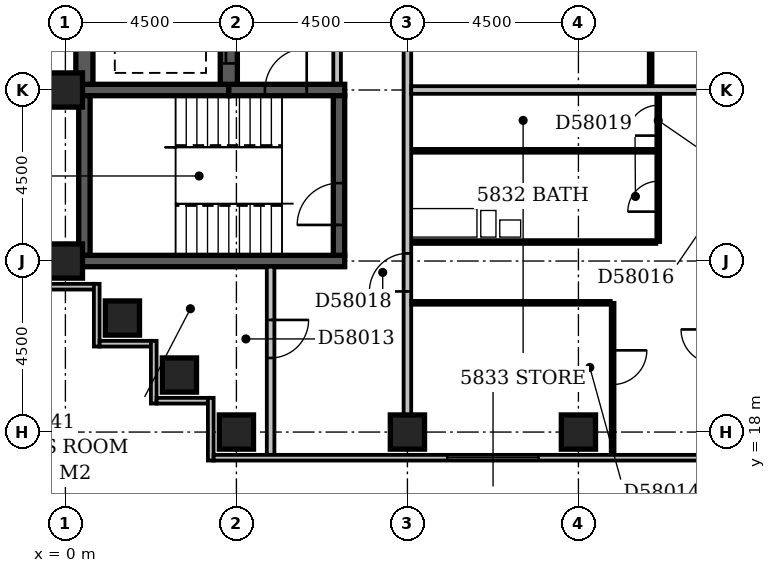
"""IFC4 building model, lengths in metres.
Left out: names, types, materials, properties, quantities, classifications, styles, units other than length and angle.
Written with IfcOpenShell. Run it as: python <this file> out.ifc"""

import sys

from ifc_helpers import new_model, si_unit, direction, frame, frame_2d, origin, origin_2d, place, context, subcontext, project, spatial, rectangle, extrude, element, fill, save


model = new_model("IFC4")
c1 = context("Model", 3, precision=1e-05, world=origin(), true_north=direction((0.0, 1.0)))
c2 = subcontext(c1, "Body", "Model", "MODEL_VIEW")
j1 = project(units=[si_unit("LENGTHUNIT", "METRE"), si_unit("PLANEANGLEUNIT", "RADIAN")], contexts=[c1])
p1 = place(None, origin())
s1 = spatial("IfcSite", under=j1, at=p1, CompositionType="ELEMENT")
p2 = place(p1, origin())
s2 = spatial("IfcBuilding", under=s1, at=p2, CompositionType="ELEMENT")
p3 = place(p2, frame((0.0, 0.0, 225.8)))
s3 = spatial("IfcBuildingStorey", under=s2, at=p3, CompositionType="ELEMENT", Elevation=225.8)
p4 = place(p3, frame((0.35, 22.5, -0.3), z_axis=(0.0, 0.0, 1.0), x_axis=(1.0, 0.0, 0.0)))
e1 = element("IfcWall", 1, at=p4, inside=s3, PredefinedType="SHEAR", context=c2, shape_type="SweptSolid", body=[
    extrude(rectangle(XDim=7.0, YDim=0.3, at=frame_2d((3.5, 0.0))), origin(), (0.0, 0.0, 1.0), 3.6),
])
p5 = place(p3, frame((0.35, 27.0, -0.3), z_axis=(0.0, 0.0, 1.0), x_axis=(1.0, 0.0, 0.0)))
e2 = element("IfcWall", 2, at=p5, inside=s3, PredefinedType="SHEAR", context=c2, shape_type="SweptSolid", body=[
    extrude(rectangle(XDim=3.95, YDim=0.3, at=frame_2d((1.975, 0.0))), origin(), (0.0, 0.0, 1.0), 3.6),
])
p6 = place(p3, frame((0.5, 22.65, -0.3), z_axis=(0.0, 0.0, 1.0), x_axis=(0.0, 1.0, 0.0)))
e3 = element("IfcWall", 3, at=p6, inside=s3, PredefinedType="SHEAR", context=c2, shape_type="SweptSolid", body=[
    extrude(rectangle(XDim=4.2, YDim=0.3, at=frame_2d((2.1, 0.0))), origin(), (0.0, 0.0, 1.0), 3.6),
])
p7 = place(p3, frame((0.5, 27.15, -0.3), z_axis=(0.0, 0.0, 1.0), x_axis=(0.0, 1.0, 0.0)))
e4 = element("IfcWall", 4, at=p7, inside=s3, PredefinedType="SHEAR", context=c2, shape_type="SweptSolid", body=[
    extrude(rectangle(XDim=22.125, YDim=0.45, at=frame_2d((11.062, 0.0))), origin(), (0.0, 0.0, 1.0), 3.6),
])
p8 = place(p3, frame((4.3, 27.0, -0.3), z_axis=(0.0, 0.0, 1.0), x_axis=(1.0, 0.0, 0.0)))
e5 = element("IfcWall", 5, at=p8, inside=s3, PredefinedType="SHEAR", context=c2, shape_type="SweptSolid", body=[
    extrude(rectangle(XDim=3.05, YDim=0.3, at=frame_2d((1.525, 0.0))), origin(), (0.0, 0.0, 1.0), 3.6),
])
p9 = place(p8, frame((0.95, 0.0, 0.3)))
e6 = element("IfcOpeningElement", 6, at=p9, cuts=e5, PredefinedType="OPENING", context=c2, shape_type="SweptSolid", body=[
    extrude(rectangle(XDim=1.1, YDim=2.1, at=frame_2d((0.55, 1.05))), frame((0.0, 0.162, 0.0), z_axis=(0.0, -1.0, 0.0), x_axis=(1.0, 0.0, 0.0)), (0.0, 0.0, 1.0), 0.324),
])
p10 = place(p3, frame((4.3, 27.15, -0.3), z_axis=(0.0, 0.0, 1.0), x_axis=(0.0, 1.0, 0.0)))
e7 = element("IfcWall", 7, at=p10, inside=s3, PredefinedType="SHEAR", context=c2, shape_type="SweptSolid", body=[
    extrude(rectangle(XDim=22.125, YDim=0.45, at=frame_2d((11.062, 0.0))), origin(), (0.0, 0.0, 1.0), 3.6),
])
p11 = place(p10, frame((3.05, 0.0, 0.3)))
e8 = element("IfcOpeningElement", 8, at=p11, cuts=e7, PredefinedType="OPENING", context=c2, shape_type="SweptSolid", body=[
    extrude(rectangle(XDim=1.1, YDim=2.1, at=frame_2d((0.55, 1.05))), frame((0.0, 0.237, 0.0), z_axis=(0.0, -1.0, 0.0), x_axis=(1.0, 0.0, 0.0)), (0.0, 0.0, 1.0), 0.474),
])
p12 = place(p10, frame((0.55, 0.0, 0.3)))
e9 = element("IfcOpeningElement", 9, at=p12, cuts=e7, PredefinedType="OPENING", context=c2, shape_type="SweptSolid", body=[
    extrude(rectangle(XDim=1.1, YDim=2.1, at=frame_2d((0.55, 1.05))), frame((0.0, 0.237, 0.0), z_axis=(0.0, -1.0, 0.0), x_axis=(1.0, 0.0, 0.0)), (0.0, 0.0, 1.0), 0.474),
])
p13 = place(p10, frame((20.55, 0.0, 0.3)))
e10 = element("IfcOpeningElement", 10, at=p13, cuts=e7, PredefinedType="OPENING", context=c2, shape_type="SweptSolid", body=[
    extrude(rectangle(XDim=1.1, YDim=2.1, at=frame_2d((0.55, 1.05))), frame((0.0, 0.237, 0.0), z_axis=(0.0, -1.0, 0.0), x_axis=(1.0, 0.0, 0.0)), (0.0, 0.0, 1.0), 0.474),
])
p14 = place(p10, frame((18.05, 0.0, 0.3)))
e11 = element("IfcOpeningElement", 11, at=p14, cuts=e7, PredefinedType="OPENING", context=c2, shape_type="SweptSolid", body=[
    extrude(rectangle(XDim=1.1, YDim=2.1, at=frame_2d((0.55, 1.05))), frame((0.0, 0.237, 0.0), z_axis=(0.0, -1.0, 0.0), x_axis=(1.0, 0.0, 0.0)), (0.0, 0.0, 1.0), 0.474),
])
p15 = place(p10, frame((15.55, 0.0, 0.3)))
e12 = element("IfcOpeningElement", 12, at=p15, cuts=e7, PredefinedType="OPENING", context=c2, shape_type="SweptSolid", body=[
    extrude(rectangle(XDim=1.1, YDim=2.1, at=frame_2d((0.55, 1.05))), frame((0.0, 0.237, 0.0), z_axis=(0.0, -1.0, 0.0), x_axis=(1.0, 0.0, 0.0)), (0.0, 0.0, 1.0), 0.474),
])
p16 = place(p10, frame((13.05, 0.0, 0.3)))
e13 = element("IfcOpeningElement", 13, at=p16, cuts=e7, PredefinedType="OPENING", context=c2, shape_type="SweptSolid", body=[
    extrude(rectangle(XDim=1.1, YDim=2.1, at=frame_2d((0.55, 1.05))), frame((0.0, 0.237, 0.0), z_axis=(0.0, -1.0, 0.0), x_axis=(1.0, 0.0, 0.0)), (0.0, 0.0, 1.0), 0.474),
])
p17 = place(p10, frame((10.55, 0.0, 0.3)))
e14 = element("IfcOpeningElement", 14, at=p17, cuts=e7, PredefinedType="OPENING", context=c2, shape_type="SweptSolid", body=[
    extrude(rectangle(XDim=1.1, YDim=2.1, at=frame_2d((0.55, 1.05))), frame((0.0, 0.237, 0.0), z_axis=(0.0, -1.0, 0.0), x_axis=(1.0, 0.0, 0.0)), (0.0, 0.0, 1.0), 0.474),
])
p18 = place(p10, frame((8.05, 0.0, 0.3)))
e15 = element("IfcOpeningElement", 15, at=p18, cuts=e7, PredefinedType="OPENING", context=c2, shape_type="SweptSolid", body=[
    extrude(rectangle(XDim=1.1, YDim=2.1, at=frame_2d((0.55, 1.05))), frame((0.0, 0.237, 0.0), z_axis=(0.0, -1.0, 0.0), x_axis=(1.0, 0.0, 0.0)), (0.0, 0.0, 1.0), 0.474),
])
p19 = place(p10, frame((5.55, 0.0, 0.3)))
e16 = element("IfcOpeningElement", 16, at=p19, cuts=e7, PredefinedType="OPENING", context=c2, shape_type="SweptSolid", body=[
    extrude(rectangle(XDim=1.1, YDim=2.1, at=frame_2d((0.55, 1.05))), frame((0.0, 0.237, 0.0), z_axis=(0.0, -1.0, 0.0), x_axis=(1.0, 0.0, 0.0)), (0.0, 0.0, 1.0), 0.474),
])
p20 = place(p3, frame((7.2, 22.65, -0.3), z_axis=(0.0, 0.0, 1.0), x_axis=(0.0, 1.0, 0.0)))
e17 = element("IfcWall", 17, at=p20, inside=s3, PredefinedType="SHEAR", context=c2, shape_type="SweptSolid", body=[
    extrude(rectangle(XDim=4.2, YDim=0.3, at=frame_2d((2.1, 0.0))), origin(), (0.0, 0.0, 1.0), 3.6),
])
p21 = place(p20, frame((0.8, 0.0, 0.3)))
e18 = element("IfcOpeningElement", 18, at=p21, cuts=e17, PredefinedType="OPENING", context=c2, shape_type="SweptSolid", body=[
    extrude(rectangle(XDim=1.1, YDim=2.1, at=frame_2d((0.55, 1.05))), frame((0.0, 0.162, 0.0), z_axis=(0.0, -1.0, 0.0), x_axis=(1.0, 0.0, 0.0)), (0.0, 0.0, 1.0), 0.324),
])
for number, where, z_axis, x_axis in (
    (19, (4.5, 18.0, -0.3), (0.0, 0.0, 1.0), (1.0, 0.0, 0.0)),
    (20, (9.0, 18.0, -0.3), (0.0, 0.0, 1.0), (1.0, 0.0, 0.0)),
    (21, (13.5, 18.0, -0.3), (0.0, 0.0, 1.0), (1.0, 0.0, 0.0)),
    (22, (3.0, 19.5, -0.3), (0.0, 0.0, 1.0), (1.0, 0.0, 0.0)),
    (23, (1.5, 21.0, -0.3), (0.0, 0.0, 1.0), (1.0, 0.0, 0.0)),
    (24, (0.0, 22.5, -0.3), (0.0, 0.0, 1.0), (1.0, 0.0, 0.0)),
    (25, (0.0, 27.0, -0.3), (0.0, 0.0, 1.0), (1.0, 0.0, 0.0)),
):
    element("IfcColumn", number, at=place(p3, frame(where, z_axis=z_axis, x_axis=x_axis)), inside=s3, PredefinedType="COLUMN", context=c2, shape_type="SweptSolid", body=[
        extrude(rectangle(XDim=0.9, YDim=0.9, at=origin_2d()), origin(), (0.0, 0.0, 1.0), 3.6),
    ])
p22 = place(p3, frame((-0.6, 21.825, 0.0), z_axis=(0.0, 0.0, 1.0), x_axis=(1.0, 0.0, 0.0)))
e26 = element("IfcWall", 26, at=p22, inside=s3, PredefinedType="STANDARD", context=c2, shape_type="SweptSolid", body=[
    extrude(rectangle(XDim=1.35, YDim=0.15, at=frame_2d((0.675, 0.0))), origin(), (0.0, 0.0, 1.0), 2.7),
])
p23 = place(p3, frame((0.825, 21.9, 0.0), z_axis=(0.0, 0.0, 1.0), x_axis=(0.0, -1.0, 0.0)))
e27 = element("IfcWall", 27, at=p23, inside=s3, PredefinedType="STANDARD", context=c2, shape_type="SweptSolid", body=[
    extrude(rectangle(XDim=1.65, YDim=0.15, at=frame_2d((0.825, 0.0))), origin(), (0.0, 0.0, 1.0), 2.7),
])
p24 = place(p3, frame((0.9, 20.325, 0.0), z_axis=(0.0, 0.0, 1.0), x_axis=(1.0, 0.0, 0.0)))
e28 = element("IfcWall", 28, at=p24, inside=s3, PredefinedType="STANDARD", context=c2, shape_type="SweptSolid", body=[
    extrude(rectangle(XDim=1.35, YDim=0.15, at=frame_2d((0.675, 0.0))), origin(), (0.0, 0.0, 1.0), 2.7),
])
p25 = place(p3, frame((2.325, 20.4, 0.0), z_axis=(0.0, 0.0, 1.0), x_axis=(0.0, -1.0, 0.0)))
e29 = element("IfcWall", 29, at=p25, inside=s3, PredefinedType="STANDARD", context=c2, shape_type="SweptSolid", body=[
    extrude(rectangle(XDim=1.65, YDim=0.15, at=frame_2d((0.825, 0.0))), origin(), (0.0, 0.0, 1.0), 2.7),
])
p26 = place(p3, frame((2.4, 18.825, 0.0), z_axis=(0.0, 0.0, 1.0), x_axis=(1.0, 0.0, 0.0)))
e30 = element("IfcWall", 30, at=p26, inside=s3, PredefinedType="STANDARD", context=c2, shape_type="SweptSolid", body=[
    extrude(rectangle(XDim=1.35, YDim=0.15, at=frame_2d((0.675, 0.0))), origin(), (0.0, 0.0, 1.0), 2.7),
])
p27 = place(p3, frame((3.825, 18.9, 0.0), z_axis=(0.0, 0.0, 1.0), x_axis=(0.0, -1.0, 0.0)))
e31 = element("IfcWall", 31, at=p27, inside=s3, PredefinedType="STANDARD", context=c2, shape_type="SweptSolid", body=[
    extrude(rectangle(XDim=1.65, YDim=0.15, at=frame_2d((0.825, 0.0))), origin(), (0.0, 0.0, 1.0), 2.7),
])
p28 = place(p3, frame((3.9, 17.325, 0.0), z_axis=(0.0, 0.0, 1.0), x_axis=(1.0, 0.0, 0.0)))
e32 = element("IfcWall", 32, at=p28, inside=s3, PredefinedType="STANDARD", context=c2, shape_type="SweptSolid", body=[
    extrude(rectangle(XDim=19.35, YDim=0.15, at=frame_2d((9.675, 0.0))), origin(), (0.0, 0.0, 1.0), 2.7),
])
p29 = place(p28, frame((6.15, 0.0, 0.6)))
e33 = element("IfcOpeningElement", 33, at=p29, cuts=e32, PredefinedType="OPENING", context=c2, shape_type="SweptSolid", body=[
    extrude(rectangle(XDim=2.4, YDim=1.8, at=frame_2d((1.2, 0.9))), frame((0.0, 0.087, 0.0), z_axis=(0.0, -1.0, 0.0), x_axis=(1.0, 0.0, 0.0)), (0.0, 0.0, 1.0), 0.174),
])
p30 = place(p28, frame((15.423, 0.0, 0.6)))
e34 = element("IfcOpeningElement", 34, at=p30, cuts=e32, PredefinedType="OPENING", context=c2, shape_type="SweptSolid", body=[
    extrude(rectangle(XDim=2.4, YDim=1.8, at=frame_2d((1.2, 0.9))), frame((0.0, 0.087, 0.0), z_axis=(0.0, -1.0, 0.0), x_axis=(1.0, 0.0, 0.0)), (0.0, 0.0, 1.0), 0.174),
])
p31 = place(p3, frame((7.15, 27.17, 0.0), z_axis=(0.0, 0.0, 1.0), x_axis=(0.0, 1.0, 0.0)))
e35 = element("IfcWall", 35, at=p31, inside=s3, PredefinedType="PARTITIONING", context=c2, shape_type="SweptSolid", body=[
    extrude(rectangle(XDim=4.83, YDim=0.2, at=frame_2d((2.415, 0.0))), origin(), (0.0, 0.0, 1.0), 3.3),
])
p32 = place(p31, frame((1.73, 0.0, 0.0)))
e36 = element("IfcOpeningElement", 36, at=p32, cuts=e35, PredefinedType="OPENING", context=c2, shape_type="SweptSolid", body=[
    extrude(rectangle(XDim=1.2, YDim=2.1, at=frame_2d((0.6, 1.05))), frame((0.0, 0.112, 0.0), z_axis=(0.0, -1.0, 0.0), x_axis=(1.0, 0.0, 0.0)), (0.0, 0.0, 1.0), 0.224),
])
p33 = place(p3, frame((5.4, 17.4, 0.0), z_axis=(0.0, 0.0, 1.0), x_axis=(0.0, 1.0, 0.0)))
e37 = element("IfcWall", 37, at=p33, inside=s3, PredefinedType="PARTITIONING", context=c2, shape_type="SweptSolid", body=[
    extrude(rectangle(XDim=4.95, YDim=0.2, at=frame_2d((2.475, 0.0))), origin(), (0.0, 0.0, 1.0), 3.3),
])
p34 = place(p33, frame((2.55, 0.0, 0.0)))
e38 = element("IfcOpeningElement", 38, at=p34, cuts=e37, PredefinedType="OPENING", context=c2, shape_type="SweptSolid", body=[
    extrude(rectangle(XDim=1.0, YDim=2.1, at=frame_2d((0.5, 1.05))), frame((0.0, 0.112, 0.0), z_axis=(0.0, -1.0, 0.0), x_axis=(1.0, 0.0, 0.0)), (0.0, 0.0, 1.0), 0.224),
])
p35 = place(p3, frame((14.4, 17.4, 0.0), z_axis=(0.0, 0.0, 1.0), x_axis=(0.0, 1.0, 0.0)))
e39 = element("IfcWall", 39, at=p35, inside=s3, PredefinedType="PARTITIONING", context=c2, shape_type="SweptSolid", body=[
    extrude(rectangle(XDim=4.0, YDim=0.1, at=frame_2d((2.0, 0.0))), origin(), (0.0, 0.0, 1.0), 3.3),
])
p36 = place(p35, frame((1.85, 0.0, 0.0)))
e40 = element("IfcOpeningElement", 40, at=p36, cuts=e39, PredefinedType="OPENING", context=c2, shape_type="SweptSolid", body=[
    extrude(rectangle(XDim=0.9, YDim=2.1, at=frame_2d((0.45, 1.05))), frame((0.0, 0.062, 0.0), z_axis=(0.0, -1.0, 0.0), x_axis=(1.0, 0.0, 0.0)), (0.0, 0.0, 1.0), 0.124),
])
p37 = place(p3, frame((9.0, 18.45, 0.0), z_axis=(0.0, 0.0, 1.0), x_axis=(0.0, 1.0, 0.0)))
e41 = element("IfcWall", 41, at=p37, inside=s3, PredefinedType="PARTITIONING", context=c2, shape_type="SweptSolid", body=[
    extrude(rectangle(XDim=17.55, YDim=0.2, at=frame_2d((8.775, 0.0))), origin(), (0.0, 0.0, 1.0), 3.3),
])
p38 = place(p37, frame((13.85, 0.0, 0.0)))
e42 = element("IfcOpeningElement", 42, at=p38, cuts=e41, PredefinedType="OPENING", context=c2, shape_type="SweptSolid", body=[
    extrude(rectangle(XDim=1.0, YDim=2.1, at=frame_2d((0.5, 1.05))), frame((0.0, 0.112, 0.0), z_axis=(0.0, -1.0, 0.0), x_axis=(1.0, 0.0, 0.0)), (0.0, 0.0, 1.0), 0.224),
])
p39 = place(p37, frame((3.25, 0.0, 0.0)))
e43 = element("IfcOpeningElement", 43, at=p39, cuts=e41, PredefinedType="OPENING", context=c2, shape_type="SweptSolid", body=[
    extrude(rectangle(XDim=1.0, YDim=2.1, at=frame_2d((0.5, 1.05))), frame((0.0, 0.112, 0.0), z_axis=(0.0, -1.0, 0.0), x_axis=(1.0, 0.0, 0.0)), (0.0, 0.0, 1.0), 0.224),
])
p40 = place(p3, frame((9.1, 21.4, 0.0), z_axis=(0.0, 0.0, 1.0), x_axis=(1.0, 0.0, 0.0)))
e44 = element("IfcWall", 44, at=p40, inside=s3, PredefinedType="PARTITIONING", context=c2, shape_type="SweptSolid", body=[
    extrude(rectangle(XDim=5.25, YDim=0.1, at=frame_2d((2.625, 0.0))), origin(), (0.0, 0.0, 1.0), 3.3),
])
p41 = place(p3, frame((9.1, 23.0, 0.0), z_axis=(0.0, 0.0, 1.0), x_axis=(1.0, 0.0, 0.0)))
e45 = element("IfcWall", 45, at=p41, inside=s3, PredefinedType="PLUMBINGWALL", context=c2, shape_type="SweptSolid", body=[
    extrude(rectangle(XDim=6.45, YDim=0.1, at=frame_2d((3.225, 0.0))), origin(), (0.0, 0.0, 1.0), 3.3),
])
p42 = place(p3, frame((15.6, 23.0, 0.0), z_axis=(0.0, 0.0, 1.0), x_axis=(0.0, 1.0, 0.0)))
e46 = element("IfcWall", 46, at=p42, inside=s3, PredefinedType="PARTITIONING", context=c2, shape_type="SweptSolid", body=[
    extrude(rectangle(XDim=3.9, YDim=0.1, at=frame_2d((1.95, 0.0))), origin(), (0.0, 0.0, 1.0), 3.3),
])
p43 = place(p42, frame((0.8, 0.0, 0.0)))
e47 = element("IfcOpeningElement", 47, at=p43, cuts=e46, PredefinedType="OPENING", context=c2, shape_type="SweptSolid", body=[
    extrude(rectangle(XDim=0.8, YDim=2.1, at=frame_2d((0.4, 1.05))), frame((0.0, 0.062, 0.0), z_axis=(0.0, -1.0, 0.0), x_axis=(1.0, 0.0, 0.0)), (0.0, 0.0, 1.0), 0.124),
])
p44 = place(p42, frame((2.8, 0.0, 0.0)))
e48 = element("IfcOpeningElement", 48, at=p44, cuts=e46, PredefinedType="OPENING", context=c2, shape_type="SweptSolid", body=[
    extrude(rectangle(XDim=0.8, YDim=2.1, at=frame_2d((0.4, 1.05))), frame((0.0, 0.062, 0.0), z_axis=(0.0, -1.0, 0.0), x_axis=(1.0, 0.0, 0.0)), (0.0, 0.0, 1.0), 0.124),
])
p45 = place(p3, frame((9.1, 25.4, 0.0), z_axis=(0.0, 0.0, 1.0), x_axis=(1.0, 0.0, 0.0)))
e49 = element("IfcWall", 49, at=p45, inside=s3, PredefinedType="PLUMBINGWALL", context=c2, shape_type="SweptSolid", body=[
    extrude(rectangle(XDim=6.45, YDim=0.1, at=frame_2d((3.225, 0.0))), origin(), (0.0, 0.0, 1.0), 3.3),
])
p46 = place(p3, frame((9.1, 27.0, 0.0), z_axis=(0.0, 0.0, 1.0), x_axis=(1.0, 0.0, 0.0)))
e50 = element("IfcWall", 50, at=p46, inside=s3, PredefinedType="PARTITIONING", context=c2, shape_type="SweptSolid", body=[
    extrude(rectangle(XDim=12.95, YDim=0.2, at=frame_2d((6.475, 0.0))), origin(), (0.0, 0.0, 1.0), 2.7),
])
p47 = place(p3, frame((15.4, 27.1, 0.0), z_axis=(0.0, 0.0, 1.0), x_axis=(0.0, 1.0, 0.0)))
e51 = element("IfcWall", 51, at=p47, inside=s3, PredefinedType="PARTITIONING", context=c2, shape_type="SweptSolid", body=[
    extrude(rectangle(XDim=4.9, YDim=0.1, at=frame_2d((2.45, 0.0))), origin(), (0.0, 0.0, 1.0), 3.3),
])
p48 = place(p47, frame((1.95, 0.0, 0.0)))
e52 = element("IfcOpeningElement", 52, at=p48, cuts=e51, PredefinedType="OPENING", context=c2, shape_type="SweptSolid", body=[
    extrude(rectangle(XDim=0.9, YDim=2.1, at=frame_2d((0.45, 1.05))), frame((0.0, 0.062, 0.0), z_axis=(0.0, -1.0, 0.0), x_axis=(1.0, 0.0, 0.0)), (0.0, 0.0, 1.0), 0.124),
])
p49 = place(p29, origin())
e53 = element("IfcWindow", 53, at=p49, inside=s3, PartitioningType="SINGLE_PANEL", PredefinedType="WINDOW", context=c2, shape_type="SweptSolid", body=[
    extrude(rectangle(XDim=2.4, YDim=1.8, at=frame_2d((1.2, 0.9))), frame((0.0, 0.03, 0.0), z_axis=(0.0, -1.0, 0.0), x_axis=(1.0, 0.0, 0.0)), (0.0, 0.0, 1.0), 0.06),
])
fill(e33, e53)
p50 = place(p12, origin())
e54 = element("IfcDoor", 54, at=p50, inside=s3, OperationType="SLIDING_TO_LEFT", PredefinedType="DOOR", context=c2, shape_type="SweptSolid", body=[
    extrude(rectangle(XDim=1.1, YDim=2.1, at=frame_2d((0.55, 1.05))), frame((0.0, 0.025, 0.0), z_axis=(0.0, -1.0, 0.0), x_axis=(1.0, 0.0, 0.0)), (0.0, 0.0, 1.0), 0.05),
])
fill(e9, e54)
p51 = place(p9, frame((1.1, 0.0, 0.0), z_axis=(0.0, 0.0, 1.0), x_axis=(-1.0, 0.0, 0.0)))
e55 = element("IfcDoor", 55, at=p51, inside=s3, OperationType="SINGLE_SWING_LEFT", PredefinedType="DOOR", context=c2, shape_type="SweptSolid", body=[
    extrude(rectangle(XDim=1.1, YDim=2.1, at=frame_2d((0.55, 1.05))), frame((0.0, 0.025, 0.0), z_axis=(0.0, -1.0, 0.0), x_axis=(1.0, 0.0, 0.0)), (0.0, 0.0, 1.0), 0.05),
])
fill(e6, e55)
p52 = place(p21, origin())
e56 = element("IfcDoor", 56, at=p52, inside=s3, OperationType="SINGLE_SWING_LEFT", PredefinedType="DOOR", context=c2, shape_type="SweptSolid", body=[
    extrude(rectangle(XDim=1.1, YDim=2.1, at=frame_2d((0.55, 1.05))), frame((0.0, 0.025, 0.0), z_axis=(0.0, -1.0, 0.0), x_axis=(1.0, 0.0, 0.0)), (0.0, 0.0, 1.0), 0.05),
])
fill(e18, e56)
p53 = place(p34, origin())
e57 = element("IfcDoor", 57, at=p53, inside=s3, OperationType="SINGLE_SWING_RIGHT", PredefinedType="DOOR", context=c2, shape_type="SweptSolid", body=[
    extrude(rectangle(XDim=1.0, YDim=2.1, at=frame_2d((0.5, 1.05))), frame((0.0, 0.025, 0.0), z_axis=(0.0, -1.0, 0.0), x_axis=(1.0, 0.0, 0.0)), (0.0, 0.0, 1.0), 0.05),
])
fill(e38, e57)
p54 = place(p36, origin())
e58 = element("IfcDoor", 58, at=p54, inside=s3, OperationType="SINGLE_SWING_RIGHT", PredefinedType="DOOR", context=c2, shape_type="SweptSolid", body=[
    extrude(rectangle(XDim=0.9, YDim=2.1, at=frame_2d((0.45, 1.05))), frame((0.0, 0.025, 0.0), z_axis=(0.0, -1.0, 0.0), x_axis=(1.0, 0.0, 0.0)), (0.0, 0.0, 1.0), 0.05),
])
fill(e40, e58)
p55 = place(p39, origin())
e59 = element("IfcDoor", 59, at=p55, inside=s3, OperationType="SINGLE_SWING_LEFT", PredefinedType="DOOR", context=c2, shape_type="SweptSolid", body=[
    extrude(rectangle(XDim=1.0, YDim=2.1, at=frame_2d((0.5, 1.05))), frame((0.0, 0.025, 0.0), z_axis=(0.0, -1.0, 0.0), x_axis=(1.0, 0.0, 0.0)), (0.0, 0.0, 1.0), 0.05),
])
fill(e43, e59)
p56 = place(p43, origin())
e60 = element("IfcDoor", 60, at=p56, inside=s3, OperationType="SINGLE_SWING_LEFT", PredefinedType="DOOR", context=c2, shape_type="SweptSolid", body=[
    extrude(rectangle(XDim=0.8, YDim=2.1, at=frame_2d((0.4, 1.05))), frame((0.0, 0.025, 0.0), z_axis=(0.0, -1.0, 0.0), x_axis=(1.0, 0.0, 0.0)), (0.0, 0.0, 1.0), 0.05),
])
fill(e47, e60)
p57 = place(p44, origin())
e61 = element("IfcDoor", 61, at=p57, inside=s3, OperationType="SINGLE_SWING_LEFT", PredefinedType="DOOR", context=c2, shape_type="SweptSolid", body=[
    extrude(rectangle(XDim=0.8, YDim=2.1, at=frame_2d((0.4, 1.05))), frame((0.0, 0.025, 0.0), z_axis=(0.0, -1.0, 0.0), x_axis=(1.0, 0.0, 0.0)), (0.0, 0.0, 1.0), 0.05),
])
fill(e48, e61)
save(model, sys.argv[1])
